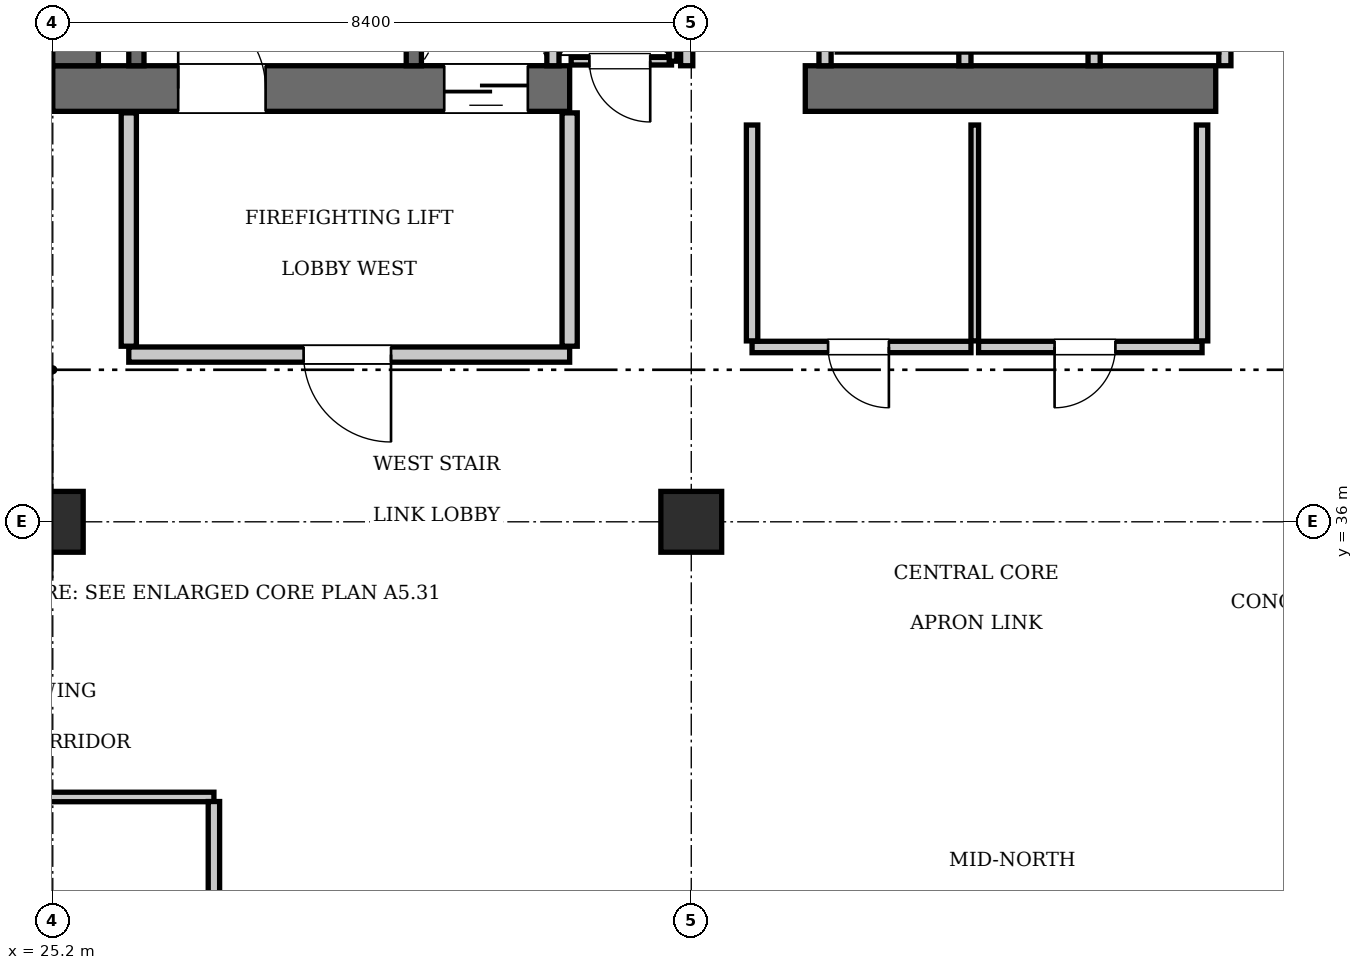
"""IFC4 building model, lengths in metres.
Left out: names, types, materials, properties, quantities, classifications, styles, units other than length and angle.
Written with IfcOpenShell. Run it as: python <this file> out.ifc"""

import sys

from ifc_helpers import new_model, si_unit, direction, frame, frame_2d, origin, origin_2d, place, context, subcontext, project, spatial, rectangle, extrude, element, fill, save


model = new_model("IFC4")
c1 = context("Model", 3, precision=1e-05, world=origin(), true_north=direction((0.0, 1.0)))
c2 = subcontext(c1, "Body", "Model", "MODEL_VIEW")
j1 = project(units=[si_unit("LENGTHUNIT", "METRE"), si_unit("PLANEANGLEUNIT", "RADIAN")], contexts=[c1])
p1 = place(None, origin())
s1 = spatial("IfcSite", under=j1, at=p1, CompositionType="ELEMENT")
p2 = place(p1, origin())
s2 = spatial("IfcBuilding", under=s1, at=p2, CompositionType="ELEMENT")
p3 = place(p2, frame((0.0, 0.0, 266.35)))
s3 = spatial("IfcBuildingStorey", under=s2, at=p3, CompositionType="ELEMENT", Elevation=266.35)
p4 = place(p3, frame((25.2, 41.7, 0.0), z_axis=(0.0, 0.0, 1.0), x_axis=(1.0, 0.0, 0.0)))
e1 = element("IfcWall", 1, at=p4, inside=s3, PredefinedType="SHEAR", context=c2, shape_type="SweptSolid", body=[
    extrude(rectangle(XDim=6.8, YDim=0.6, at=frame_2d((3.4, 0.0))), origin(), (0.0, 0.0, 1.0), 3.85),
])
p5 = place(p4, frame((1.65, 0.0, 0.0)))
e2 = element("IfcOpeningElement", 2, at=p5, cuts=e1, PredefinedType="OPENING", context=c2, shape_type="SweptSolid", body=[
    extrude(rectangle(XDim=1.15, YDim=2.15, at=frame_2d((0.575, 1.075))), frame((0.0, 0.31, 0.0), z_axis=(0.0, -1.0, 0.0), x_axis=(1.0, 0.0, 0.0)), (0.0, 0.0, 1.0), 0.62),
])
p6 = place(p4, frame((5.15, 0.0, 0.0)))
e3 = element("IfcOpeningElement", 3, at=p6, cuts=e1, PredefinedType="OPENING", context=c2, shape_type="SweptSolid", body=[
    extrude(rectangle(XDim=1.1, YDim=2.2, at=frame_2d((0.55, 1.1))), frame((0.0, 0.31, 0.0), z_axis=(0.0, -1.0, 0.0), x_axis=(1.0, 0.0, 0.0)), (0.0, 0.0, 1.0), 0.62),
])
p7 = place(p3, frame((35.1, 41.7, 0.0), z_axis=(0.0, 0.0, 1.0), x_axis=(1.0, 0.0, 0.0)))
e4 = element("IfcWall", 4, at=p7, inside=s3, PredefinedType="SHEAR", context=c2, shape_type="SweptSolid", body=[
    extrude(rectangle(XDim=5.4, YDim=0.6, at=frame_2d((2.7, 0.0))), origin(), (0.0, 0.0, 1.0), 3.85),
])
p8 = place(p3, frame((25.5, 42.0, 0.0), z_axis=(0.0, 0.0, 1.0), x_axis=(0.0, 1.0, 0.0)))
e5 = element("IfcWall", 5, at=p8, inside=s3, PredefinedType="SHEAR", context=c2, shape_type="SweptSolid", body=[
    extrude(rectangle(XDim=2.2, YDim=0.6, at=frame_2d((1.1, 0.0))), origin(), (0.0, 0.0, 1.0), 3.85),
])
for number, where, z_axis, x_axis in (
    (6, (25.2, 36.0, 0.0), (0.0, 0.0, 1.0), (1.0, 0.0, 0.0)),
    (7, (33.6, 36.0, 0.0), (0.0, 0.0, 1.0), (1.0, 0.0, 0.0)),
):
    element("IfcColumn", number, at=place(p3, frame(where, z_axis=z_axis, x_axis=x_axis)), inside=s3, PredefinedType="COLUMN", context=c2, shape_type="SweptSolid", body=[
        extrude(rectangle(XDim=0.8, YDim=0.8, at=origin_2d()), origin(), (0.0, 0.0, 1.0), 3.85),
    ])
p9 = place(p3, frame((29.95, 42.0, 0.0), z_axis=(0.0, 0.0, 1.0), x_axis=(0.0, 1.0, 0.0)))
e8 = element("IfcWall", 8, at=p9, inside=s3, PredefinedType="SOLIDWALL", context=c2, shape_type="SweptSolid", body=[
    extrude(rectangle(XDim=9.15, YDim=0.2, at=frame_2d((4.575, 0.0))), origin(), (0.0, 0.0, 1.0), 3.61),
])
p10 = place(p3, frame((26.3, 42.0, 0.0), z_axis=(0.0, 0.0, 1.0), x_axis=(0.0, 1.0, 0.0)))
e9 = element("IfcWall", 9, at=p10, inside=s3, PredefinedType="SOLIDWALL", context=c2, shape_type="SweptSolid", body=[
    extrude(rectangle(XDim=9.12, YDim=0.2, at=frame_2d((4.56, 0.0))), origin(), (0.0, 0.0, 1.0), 3.61),
])
p11 = place(p3, frame((31.78, 42.0, 0.0), z_axis=(0.0, 0.0, 1.0), x_axis=(0.0, 1.0, 0.0)))
e10 = element("IfcWall", 10, at=p11, inside=s3, PredefinedType="SOLIDWALL", context=c2, shape_type="SweptSolid", body=[
    extrude(rectangle(XDim=2.74, YDim=0.16, at=frame_2d((1.37, 0.0))), origin(), (0.0, 0.0, 1.0), 3.61),
])
for number, where, z_axis, x_axis in (
    (11, (37.2, 42.0, 0.0), (0.0, 0.0, 1.0), (0.0, 1.0, 0.0)),
    (12, (38.9, 42.0, 0.0), (0.0, 0.0, 1.0), (0.0, 1.0, 0.0)),
    (13, (40.62, 42.0, 0.0), (0.0, 0.0, 1.0), (0.0, 1.0, 0.0)),
):
    element("IfcWall", number, at=place(p3, frame(where, z_axis=z_axis, x_axis=x_axis)), inside=s3, PredefinedType="SOLIDWALL", context=c2, shape_type="SweptSolid", body=[
        extrude(rectangle(XDim=2.35, YDim=0.16, at=frame_2d((1.175, 0.0))), origin(), (0.0, 0.0, 1.0), 3.61),
    ])
for number, where, z_axis, x_axis in (
    (14, (33.54, 42.0, 0.0), (0.0, 0.0, 1.0), (0.0, 1.0, 0.0)),
    (15, (35.36, 42.0, 0.0), (0.0, 0.0, 1.0), (0.0, 1.0, 0.0)),
):
    element("IfcWall", number, at=place(p3, frame(where, z_axis=z_axis, x_axis=x_axis)), inside=s3, PredefinedType="SOLIDWALL", context=c2, shape_type="SweptSolid", body=[
        extrude(rectangle(XDim=2.4, YDim=0.16, at=frame_2d((1.2, 0.0))), origin(), (0.0, 0.0, 1.0), 3.61),
    ])
p12 = place(p3, frame((26.2, 38.2, 0.0), z_axis=(0.0, 0.0, 1.0), x_axis=(1.0, 0.0, 0.0)))
e16 = element("IfcWall", 16, at=p12, inside=s3, PredefinedType="PARTITIONING", context=c2, shape_type="SweptSolid", body=[
    extrude(rectangle(XDim=5.8, YDim=0.2, at=frame_2d((2.9, 0.0))), origin(), (0.0, 0.0, 1.0), 3.61),
])
p13 = place(p12, frame((2.3, 0.0, 0.0)))
e17 = element("IfcOpeningElement", 17, at=p13, cuts=e16, PredefinedType="OPENING", context=c2, shape_type="SweptSolid", body=[
    extrude(rectangle(XDim=1.15, YDim=2.15, at=frame_2d((0.575, 1.075))), frame((0.0, 0.11, 0.0), z_axis=(0.0, -1.0, 0.0), x_axis=(1.0, 0.0, 0.0)), (0.0, 0.0, 1.0), 0.22),
])
for number, where, z_axis, x_axis in (
    (18, (26.2, 38.31, 0.0), (0.0, 0.0, 1.0), (0.0, 1.0, 0.0)),
    (19, (32.0, 38.31, 0.0), (0.0, 0.0, 1.0), (0.0, 1.0, 0.0)),
):
    element("IfcWall", number, at=place(p3, frame(where, z_axis=z_axis, x_axis=x_axis)), inside=s3, PredefinedType="PARTITIONING", context=c2, shape_type="SweptSolid", body=[
        extrude(rectangle(XDim=3.07, YDim=0.2, at=frame_2d((1.535, 0.0))), origin(), (0.0, 0.0, 1.0), 3.61),
    ])
p14 = place(p3, frame((32.02, 42.06, 0.0), z_axis=(0.0, 0.0, 1.0), x_axis=(1.0, 0.0, 0.0)))
e20 = element("IfcWall", 20, at=p14, inside=s3, PredefinedType="PARTITIONING", context=c2, shape_type="SweptSolid", body=[
    extrude(rectangle(XDim=1.32, YDim=0.1, at=frame_2d((0.66, 0.0))), origin(), (0.0, 0.0, 1.0), 3.61),
])
p15 = place(p14, frame((0.24, 0.0, 0.0)))
e21 = element("IfcOpeningElement", 21, at=p15, cuts=e20, PredefinedType="OPENING", context=c2, shape_type="SweptSolid", body=[
    extrude(rectangle(XDim=0.8, YDim=2.05, at=frame_2d((0.4, 1.025))), frame((0.0, 0.06, 0.0), z_axis=(0.0, -1.0, 0.0), x_axis=(1.0, 0.0, 0.0)), (0.0, 0.0, 1.0), 0.12),
])
p16 = place(p3, frame((33.36, 42.06, 0.0), z_axis=(0.0, 0.0, 1.0), x_axis=(0.0, 1.0, 0.0)))
e22 = element("IfcWall", 22, at=p16, inside=s3, PredefinedType="PARTITIONING", context=c2, shape_type="SweptSolid", body=[
    extrude(rectangle(XDim=2.88, YDim=0.1, at=frame_2d((1.44, 0.0))), origin(), (0.0, 0.0, 1.0), 3.61),
])
p17 = place(p3, frame((34.4, 38.3, 0.0), z_axis=(0.0, 0.0, 1.0), x_axis=(1.0, 0.0, 0.0)))
e23 = element("IfcWall", 23, at=p17, inside=s3, PredefinedType="PARTITIONING", context=c2, shape_type="SweptSolid", body=[
    extrude(rectangle(XDim=2.88, YDim=0.15, at=frame_2d((1.44, 0.0))), origin(), (0.0, 0.0, 1.0), 3.61),
])
p18 = place(p17, frame((1.0, 0.0, 0.0)))
e24 = element("IfcOpeningElement", 24, at=p18, cuts=e23, PredefinedType="OPENING", context=c2, shape_type="SweptSolid", body=[
    extrude(rectangle(XDim=0.8, YDim=2.05, at=frame_2d((0.4, 1.025))), frame((0.0, 0.085, 0.0), z_axis=(0.0, -1.0, 0.0), x_axis=(1.0, 0.0, 0.0)), (0.0, 0.0, 1.0), 0.17),
])
p19 = place(p3, frame((37.38, 38.3, 0.0), z_axis=(0.0, 0.0, 1.0), x_axis=(1.0, 0.0, 0.0)))
e25 = element("IfcWall", 25, at=p19, inside=s3, PredefinedType="PARTITIONING", context=c2, shape_type="SweptSolid", body=[
    extrude(rectangle(XDim=2.94, YDim=0.15, at=frame_2d((1.47, 0.0))), origin(), (0.0, 0.0, 1.0), 3.61),
])
p20 = place(p19, frame((1.0, 0.0, 0.0)))
e26 = element("IfcOpeningElement", 26, at=p20, cuts=e25, PredefinedType="OPENING", context=c2, shape_type="SweptSolid", body=[
    extrude(rectangle(XDim=0.8, YDim=2.05, at=frame_2d((0.4, 1.025))), frame((0.0, 0.085, 0.0), z_axis=(0.0, -1.0, 0.0), x_axis=(1.0, 0.0, 0.0)), (0.0, 0.0, 1.0), 0.17),
])
p21 = place(p3, frame((34.4, 38.38, 0.0), z_axis=(0.0, 0.0, 1.0), x_axis=(0.0, 1.0, 0.0)))
e27 = element("IfcWall", 27, at=p21, inside=s3, PredefinedType="PARTITIONING", context=c2, shape_type="SweptSolid", body=[
    extrude(rectangle(XDim=2.84, YDim=0.15, at=frame_2d((1.42, 0.0))), origin(), (0.0, 0.0, 1.0), 3.61),
])
p22 = place(p3, frame((37.33, 38.38, 0.0), z_axis=(0.0, 0.0, 1.0), x_axis=(0.0, 1.0, 0.0)))
e28 = element("IfcWall", 28, at=p22, inside=s3, PredefinedType="PARTITIONING", context=c2, shape_type="SweptSolid", body=[
    extrude(rectangle(XDim=2.84, YDim=0.1, at=frame_2d((1.42, 0.0))), origin(), (0.0, 0.0, 1.0), 3.61),
])
p23 = place(p3, frame((40.32, 38.38, 0.0), z_axis=(0.0, 0.0, 1.0), x_axis=(0.0, 1.0, 0.0)))
e29 = element("IfcWall", 29, at=p23, inside=s3, PredefinedType="PARTITIONING", context=c2, shape_type="SweptSolid", body=[
    extrude(rectangle(XDim=2.84, YDim=0.15, at=frame_2d((1.42, 0.0))), origin(), (0.0, 0.0, 1.0), 3.61),
])
p24 = place(p3, frame((15.5, 32.38, 0.0), z_axis=(0.0, 0.0, 1.0), x_axis=(1.0, 0.0, 0.0)))
e30 = element("IfcWall", 30, at=p24, inside=s3, PredefinedType="PARTITIONING", context=c2, shape_type="SweptSolid", body=[
    extrude(rectangle(XDim=11.82, YDim=0.125, at=frame_2d((5.91, 0.0))), origin(), (0.0, 0.0, 1.0), 3.61),
])
p25 = place(p3, frame((27.32, 30.24, 0.0), z_axis=(0.0, 0.0, 1.0), x_axis=(0.0, 1.0, 0.0)))
e31 = element("IfcWall", 31, at=p25, inside=s3, PredefinedType="PARTITIONING", context=c2, shape_type="SweptSolid", body=[
    extrude(rectangle(XDim=2.08, YDim=0.15, at=frame_2d((1.04, 0.0))), origin(), (0.0, 0.0, 1.0), 3.61),
])
p26 = place(p5, origin())
e32 = element("IfcDoor", 32, at=p26, inside=s3, OperationType="SINGLE_SWING_LEFT", PredefinedType="DOOR", context=c2, shape_type="SweptSolid", body=[
    extrude(rectangle(XDim=1.15, YDim=2.15, at=frame_2d((0.575, 1.075))), frame((0.0, 0.025, 0.0), z_axis=(0.0, -1.0, 0.0), x_axis=(1.0, 0.0, 0.0)), (0.0, 0.0, 1.0), 0.05),
])
fill(e2, e32)
p27 = place(p6, frame((1.1, 0.0, 0.0), z_axis=(0.0, 0.0, 1.0), x_axis=(-1.0, 0.0, 0.0)))
e33 = element("IfcDoor", 33, at=p27, inside=s3, OperationType="SLIDING_TO_LEFT", PredefinedType="DOOR", context=c2, shape_type="SweptSolid", body=[
    extrude(rectangle(XDim=1.1, YDim=2.2, at=frame_2d((0.55, 1.1))), frame((0.0, 0.025, 0.0), z_axis=(0.0, -1.0, 0.0), x_axis=(1.0, 0.0, 0.0)), (0.0, 0.0, 1.0), 0.05),
])
fill(e3, e33)
p28 = place(p13, frame((1.15, 0.0, 0.0), z_axis=(0.0, 0.0, 1.0), x_axis=(-1.0, 0.0, 0.0)))
e34 = element("IfcDoor", 34, at=p28, inside=s3, OperationType="SINGLE_SWING_LEFT", PredefinedType="DOOR", context=c2, shape_type="SweptSolid", body=[
    extrude(rectangle(XDim=1.15, YDim=2.15, at=frame_2d((0.575, 1.075))), frame((0.0, 0.025, 0.0), z_axis=(0.0, -1.0, 0.0), x_axis=(1.0, 0.0, 0.0)), (0.0, 0.0, 1.0), 0.05),
])
fill(e17, e34)
p29 = place(p15, frame((0.8, 0.0, 0.0), z_axis=(0.0, 0.0, 1.0), x_axis=(-1.0, 0.0, 0.0)))
e35 = element("IfcDoor", 35, at=p29, inside=s3, OperationType="SINGLE_SWING_LEFT", PredefinedType="DOOR", context=c2, shape_type="SweptSolid", body=[
    extrude(rectangle(XDim=0.8, YDim=2.05, at=frame_2d((0.4, 1.025))), frame((0.0, 0.025, 0.0), z_axis=(0.0, -1.0, 0.0), x_axis=(1.0, 0.0, 0.0)), (0.0, 0.0, 1.0), 0.05),
])
fill(e21, e35)
p30 = place(p18, frame((0.8, 0.0, 0.0), z_axis=(0.0, 0.0, 1.0), x_axis=(-1.0, 0.0, 0.0)))
e36 = element("IfcDoor", 36, at=p30, inside=s3, OperationType="SINGLE_SWING_LEFT", PredefinedType="DOOR", context=c2, shape_type="SweptSolid", body=[
    extrude(rectangle(XDim=0.8, YDim=2.05, at=frame_2d((0.4, 1.025))), frame((0.0, 0.025, 0.0), z_axis=(0.0, -1.0, 0.0), x_axis=(1.0, 0.0, 0.0)), (0.0, 0.0, 1.0), 0.05),
])
fill(e24, e36)
p31 = place(p20, frame((0.8, 0.0, 0.0), z_axis=(0.0, 0.0, 1.0), x_axis=(-1.0, 0.0, 0.0)))
e37 = element("IfcDoor", 37, at=p31, inside=s3, OperationType="SINGLE_SWING_RIGHT", PredefinedType="DOOR", context=c2, shape_type="SweptSolid", body=[
    extrude(rectangle(XDim=0.8, YDim=2.05, at=frame_2d((0.4, 1.025))), frame((0.0, 0.025, 0.0), z_axis=(0.0, -1.0, 0.0), x_axis=(1.0, 0.0, 0.0)), (0.0, 0.0, 1.0), 0.05),
])
fill(e26, e37)
save(model, sys.argv[1])
